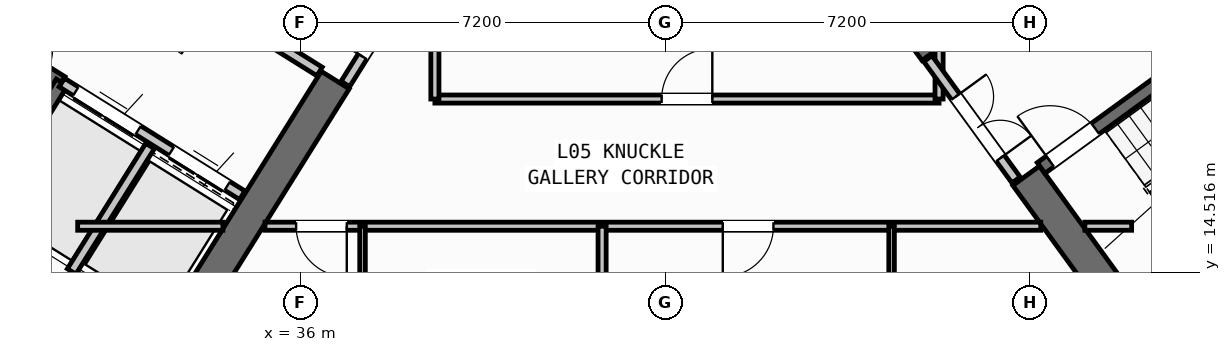
"""IFC4 building model, lengths in metres.
Left out: names, types, materials, properties, quantities, classifications, styles, units other than length and angle.
Written with IfcOpenShell. Run it as: python <this file> out.ifc"""

import sys

from ifc_helpers import new_model, si_unit, direction, frame, frame_2d, origin, place, context, subcontext, project, spatial, rectangle, extrude, source, transform, mapped, element, fill, save


model = new_model("IFC4")
c1 = context("Model", 3, precision=1e-05, world=origin(), true_north=direction((0.0, 1.0)))
c2 = subcontext(c1, "Body", "Model", "MODEL_VIEW")
j1 = project(units=[si_unit("LENGTHUNIT", "METRE"), si_unit("PLANEANGLEUNIT", "RADIAN")], contexts=[c1])
p1 = place(None, origin())
s1 = spatial("IfcSite", under=j1, at=p1, CompositionType="ELEMENT")
p2 = place(p1, origin())
s2 = spatial("IfcBuilding", under=s1, at=p2, CompositionType="ELEMENT")
p3 = place(p2, frame((0.0, 0.0, 24.0)))
s3 = spatial("IfcBuildingStorey", under=s2, at=p3, CompositionType="ELEMENT", Elevation=24.0)
p4 = place(p3, frame((33.409, 12.45, 0.0), z_axis=(0.0, 0.0, 1.0), x_axis=(-0.848051132073, 0.529914405721, 0.0)))
e1 = element("IfcWall", 1, at=p4, inside=s3, PredefinedType="SHEAR", context=c2, shape_type="SweptSolid", body=[
    extrude(rectangle(XDim=13.24, YDim=0.65, at=frame_2d((6.62, 0.0))), origin(), (0.0, 0.0, 1.0), 3.35),
])
p5 = place(p3, frame((36.683, 18.304, 0.0), z_axis=(0.0, 0.0, 1.0), x_axis=(-0.529899109053, -0.848060690178, 0.0)))
e2 = element("IfcWall", 2, at=p5, inside=s3, PredefinedType="SHEAR", context=c2, shape_type="SweptSolid", body=[
    extrude(rectangle(XDim=6.375, YDim=0.65, at=frame_2d((3.188, 0.0))), origin(), (0.0, 0.0, 1.0), 3.35),
])
p6 = place(p3, frame((52.318, 13.11, 0.0), z_axis=(0.0, 0.0, 1.0), x_axis=(0.809019445368, 0.587781878776, 0.0)))
e3 = element("IfcWall", 3, at=p6, inside=s3, PredefinedType="SHEAR", context=c2, shape_type="SweptSolid", body=[
    extrude(rectangle(XDim=12.44, YDim=0.65, at=frame_2d((6.22, 0.0))), origin(), (0.0, 0.0, 1.0), 3.35),
])
p7 = place(p3, frame((52.39, 13.564, 0.0), z_axis=(0.0, 0.0, 1.0), x_axis=(-0.58779688989, 0.809008539037, 0.0)))
e4 = element("IfcWall", 4, at=p7, inside=s3, PredefinedType="SHEAR", context=c2, shape_type="SweptSolid", body=[
    extrude(rectangle(XDim=3.525, YDim=0.65, at=frame_2d((1.763, 0.0))), origin(), (0.0, 0.0, 1.0), 3.35),
])
p8 = place(p3, frame((48.526, 18.884, 0.0), z_axis=(0.0, 0.0, 1.0), x_axis=(-0.58777996584, 0.809020835181, 0.0)))
e5 = element("IfcWall", 5, at=p8, inside=s3, PredefinedType="SHEAR", context=c2, shape_type="SweptSolid", body=[
    extrude(rectangle(XDim=6.375, YDim=0.65, at=frame_2d((3.188, 0.0))), origin(), (0.0, 0.0, 1.0), 3.35),
])
p9 = place(p3, frame((31.28, 18.261, 0.0), z_axis=(0.0, 0.0, 1.0), x_axis=(-0.848051618787, 0.529913626805, 0.0)))
e6 = element("IfcWall", 6, at=p9, inside=s3, PredefinedType="SHEAR", context=c2, shape_type="SweptSolid", body=[
    extrude(rectangle(XDim=7.46, YDim=0.26, at=frame_2d((3.73, 0.0))), origin(), (0.0, 0.0, 1.0), 3.35),
])
p10 = place(p9, frame((0.36, 0.0, 0.0)))
e7 = element("IfcOpeningElement", 7, at=p10, cuts=e6, PredefinedType="OPENING", context=c2, shape_type="SweptSolid", body=[
    extrude(rectangle(XDim=0.86, YDim=2.05, at=frame_2d((0.43, 1.025))), frame((0.0, 0.14, 0.0), z_axis=(0.0, -1.0, 0.0), x_axis=(1.0, 0.0, 0.0)), (0.0, 0.0, 1.0), 0.28),
])
p11 = place(p3, frame((31.288, 18.256, 0.0), z_axis=(0.0, 0.0, 1.0), x_axis=(-0.529943379326, -0.848033026897, 0.0)))
e8 = element("IfcWall", 8, at=p11, inside=s3, PredefinedType="SHEAR", context=c2, shape_type="SweptSolid", body=[
    extrude(rectangle(XDim=3.16, YDim=0.26, at=frame_2d((1.58, 0.0))), origin(), (0.0, 0.0, 1.0), 3.35),
])
p12 = place(p3, frame((34.848, 16.031, 0.0), z_axis=(0.0, 0.0, 1.0), x_axis=(-0.848044042236, 0.529925751807, 0.0)))
e9 = element("IfcWall", 9, at=p12, inside=s3, PredefinedType="STANDARD", context=c2, shape_type="SweptSolid", body=[
    extrude(rectangle(XDim=4.198, YDim=0.2, at=frame_2d((2.099, 0.0))), origin(), (0.0, 0.0, 1.0), 3.34),
])
p13 = place(p12, frame((0.348, 0.0, 0.0)))
e10 = element("IfcOpeningElement", 10, at=p13, cuts=e9, PredefinedType="OPENING", context=c2, shape_type="SweptSolid", body=[
    extrude(rectangle(XDim=1.3, YDim=2.2, at=frame_2d((0.65, 1.1))), frame((0.0, 0.11, 0.0), z_axis=(0.0, -1.0, 0.0), x_axis=(1.0, 0.0, 0.0)), (0.0, 0.0, 1.0), 0.22),
])
p14 = place(p12, frame((2.423, 0.0, 0.0)))
e11 = element("IfcOpeningElement", 11, at=p14, cuts=e9, PredefinedType="OPENING", context=c2, shape_type="SweptSolid", body=[
    extrude(rectangle(XDim=1.45, YDim=2.25, at=frame_2d((0.725, 1.125))), frame((0.0, 0.11, 0.0), z_axis=(0.0, -1.0, 0.0), x_axis=(1.0, 0.0, 0.0)), (0.0, 0.0, 1.0), 0.22),
])
p15 = place(p3, frame((36.374, 18.474, 0.0), z_axis=(0.0, 0.0, 1.0), x_axis=(-0.848051071577, 0.529914502535, 0.0)))
e12 = element("IfcWall", 12, at=p15, inside=s3, PredefinedType="STANDARD", context=c2, shape_type="SweptSolid", body=[
    extrude(rectangle(XDim=5.718, YDim=0.2, at=frame_2d((2.859, 0.0))), origin(), (0.0, 0.0, 1.0), 3.34),
])
p16 = place(p15, frame((2.498, 0.0, 0.0)))
e13 = element("IfcOpeningElement", 13, at=p16, cuts=e12, PredefinedType="OPENING", context=c2, shape_type="SweptSolid", body=[
    extrude(rectangle(XDim=1.15, YDim=2.1, at=frame_2d((0.575, 1.05))), frame((0.0, 0.11, 0.0), z_axis=(0.0, -1.0, 0.0), x_axis=(1.0, 0.0, 0.0)), (0.0, 0.0, 1.0), 0.22),
])
p17 = place(p3, frame((33.029, 17.003, 0.0), z_axis=(0.0, 0.0, 1.0), x_axis=(-0.529916267533, -0.848049968695, 0.0)))
e14 = element("IfcWall", 14, at=p17, inside=s3, PredefinedType="STANDARD", context=c2, shape_type="SweptSolid", body=[
    extrude(rectangle(XDim=2.92, YDim=0.2, at=frame_2d((1.46, 0.0))), origin(), (0.0, 0.0, 1.0), 3.34),
])
p18 = place(p3, frame((52.472, 14.013, 0.0), z_axis=(0.0, 0.0, 1.0), x_axis=(0.809028366311, 0.587769599847, 0.0)))
e15 = element("IfcWall", 15, at=p18, inside=s3, PredefinedType="SHEAR", context=c2, shape_type="SweptSolid", body=[
    extrude(rectangle(XDim=7.33, YDim=0.26, at=frame_2d((3.665, 0.0))), origin(), (0.0, 0.0, 1.0), 3.35),
])
p19 = place(p3, frame((50.615, 16.57, 0.0), z_axis=(0.0, 0.0, 1.0), x_axis=(0.809028366311, 0.587769599847, 0.0)))
e16 = element("IfcWall", 16, at=p19, inside=s3, PredefinedType="SHEAR", context=c2, shape_type="SweptSolid", body=[
    extrude(rectangle(XDim=7.33, YDim=0.26, at=frame_2d((3.665, 0.0))), origin(), (0.0, 0.0, 1.0), 3.35),
])
p20 = place(p19, frame((0.22, 0.0, 0.0)))
e17 = element("IfcOpeningElement", 17, at=p20, cuts=e16, PredefinedType="OPENING", context=c2, shape_type="SweptSolid", body=[
    extrude(rectangle(XDim=1.1, YDim=2.1, at=frame_2d((0.55, 1.05))), frame((0.0, 0.14, 0.0), z_axis=(0.0, -1.0, 0.0), x_axis=(1.0, 0.0, 0.0)), (0.0, 0.0, 1.0), 0.28),
])
p21 = place(p3, frame((32.164, 10.374, 0.0), z_axis=(0.0, 0.0, 1.0), x_axis=(-0.848044107957, 0.529925646633, 0.0)))
e18 = element("IfcWall", 18, at=p21, inside=s3, PredefinedType="PARTITIONING", context=c2, shape_type="SweptSolid", body=[
    extrude(rectangle(XDim=15.57, YDim=0.16, at=frame_2d((7.785, 0.0))), origin(), (0.0, 0.0, 1.0), 3.34),
])
p22 = place(p21, frame((10.83, 0.0, 0.0)))
e19 = element("IfcOpeningElement", 19, at=p22, cuts=e18, PredefinedType="OPENING", context=c2, shape_type="SweptSolid", body=[
    extrude(rectangle(XDim=1.0, YDim=2.1, at=frame_2d((0.5, 1.05))), frame((0.0, 0.09, 0.0), z_axis=(0.0, -1.0, 0.0), x_axis=(1.0, 0.0, 0.0)), (0.0, 0.0, 1.0), 0.18),
])
p23 = place(p3, frame((38.451, 20.737, 0.0), z_axis=(0.0, 0.0, 1.0), x_axis=(-0.529924799939, -0.848044637038, 0.0)))
e20 = element("IfcWall", 20, at=p23, inside=s3, PredefinedType="STANDARD", context=c2, shape_type="SweptSolid", body=[
    extrude(rectangle(XDim=2.96, YDim=0.2, at=frame_2d((1.48, 0.0))), origin(), (0.0, 0.0, 1.0), 3.34),
])
p24 = place(p23, frame((1.46, 0.0, 0.0)))
e21 = element("IfcOpeningElement", 21, at=p24, cuts=e20, PredefinedType="OPENING", context=c2, shape_type="SweptSolid", body=[
    extrude(rectangle(XDim=0.86, YDim=2.05, at=frame_2d((0.43, 1.025))), frame((0.0, 0.11, 0.0), z_axis=(0.0, -1.0, 0.0), x_axis=(1.0, 0.0, 0.0)), (0.0, 0.0, 1.0), 0.22),
])
p25 = place(p3, frame((31.6, 15.42, 0.0), z_axis=(0.0, 0.0, 1.0), x_axis=(1.0, 0.0, 0.0)))
e22 = element("IfcWall", 22, at=p25, inside=s3, PredefinedType="PARTITIONING", context=c2, shape_type="SweptSolid", body=[
    extrude(rectangle(XDim=2.866, YDim=0.16, at=frame_2d((1.433, 0.0))), origin(), (0.0, 0.0, 1.0), 3.34),
])
p26 = place(p3, frame((35.296, 15.42, 0.0), z_axis=(0.0, 0.0, 1.0), x_axis=(1.0, 0.0, 0.0)))
e23 = element("IfcWall", 23, at=p26, inside=s3, PredefinedType="PARTITIONING", context=c2, shape_type="SweptSolid", body=[
    extrude(rectangle(XDim=15.311, YDim=0.16, at=frame_2d((7.655, 0.0))), origin(), (0.0, 0.0, 1.0), 3.34),
])
p27 = place(p26, frame((0.615, 0.0, 0.0)))
e24 = element("IfcOpeningElement", 24, at=p27, cuts=e23, PredefinedType="OPENING", context=c2, shape_type="SweptSolid", body=[
    extrude(rectangle(XDim=1.0, YDim=2.1, at=frame_2d((0.5, 1.05))), frame((0.0, 0.09, 0.0), z_axis=(0.0, -1.0, 0.0), x_axis=(1.0, 0.0, 0.0)), (0.0, 0.0, 1.0), 0.18),
])
p28 = place(p26, frame((9.035, 0.0, 0.0)))
e25 = element("IfcOpeningElement", 25, at=p28, cuts=e23, PredefinedType="OPENING", context=c2, shape_type="SweptSolid", body=[
    extrude(rectangle(XDim=1.0, YDim=2.1, at=frame_2d((0.5, 1.05))), frame((0.0, 0.09, 0.0), z_axis=(0.0, -1.0, 0.0), x_axis=(1.0, 0.0, 0.0)), (0.0, 0.0, 1.0), 0.18),
])
p29 = place(p3, frame((51.477, 15.42, 0.0), z_axis=(0.0, 0.0, 1.0), x_axis=(1.0, 0.0, 0.0)))
e26 = element("IfcWall", 26, at=p29, inside=s3, PredefinedType="PARTITIONING", context=c2, shape_type="SweptSolid", body=[
    extrude(rectangle(XDim=0.923, YDim=0.16, at=frame_2d((0.461, 0.0))), origin(), (0.0, 0.0, 1.0), 3.34),
])
p30 = place(p3, frame((38.65, 17.93, 0.0), z_axis=(0.0, 0.0, 1.0), x_axis=(1.0, 0.0, 0.0)))
e27 = element("IfcWall", 27, at=p30, inside=s3, PredefinedType="PARTITIONING", context=c2, shape_type="SweptSolid", body=[
    extrude(rectangle(XDim=9.95, YDim=0.16, at=frame_2d((4.975, 0.0))), origin(), (0.0, 0.0, 1.0), 3.34),
])
p31 = place(p30, frame((4.475, 0.0, 0.0)))
e28 = element("IfcOpeningElement", 28, at=p31, cuts=e27, PredefinedType="OPENING", context=c2, shape_type="SweptSolid", body=[
    extrude(rectangle(XDim=1.0, YDim=2.1, at=frame_2d((0.5, 1.05))), frame((0.0, 0.09, 0.0), z_axis=(0.0, -1.0, 0.0), x_axis=(1.0, 0.0, 0.0)), (0.0, 0.0, 1.0), 0.18),
])
p32 = place(p3, frame((38.65, 17.93, 0.0), z_axis=(0.0, 0.0, 1.0), x_axis=(0.0, 1.0, 0.0)))
e29 = element("IfcWall", 29, at=p32, inside=s3, PredefinedType="PARTITIONING", context=c2, shape_type="SweptSolid", body=[
    extrude(rectangle(XDim=2.857, YDim=0.16, at=frame_2d((1.428, 0.0))), origin(), (0.0, 0.0, 1.0), 3.34),
])
p33 = place(p3, frame((48.6, 17.93, 0.0), z_axis=(0.0, 0.0, 1.0), x_axis=(0.0, 1.0, 0.0)))
e30 = element("IfcWall", 30, at=p33, inside=s3, PredefinedType="PARTITIONING", context=c2, shape_type="SweptSolid", body=[
    extrude(rectangle(XDim=0.993, YDim=0.16, at=frame_2d((0.496, 0.0))), origin(), (0.0, 0.0, 1.0), 3.34),
])
p34 = place(p3, frame((50.119, 16.333, 0.0), z_axis=(0.0, 0.0, 1.0), x_axis=(-0.587749856981, 0.809042709391, 0.0)))
e31 = element("IfcWall", 31, at=p34, inside=s3, PredefinedType="STANDARD", context=c2, shape_type="SweptSolid", body=[
    extrude(rectangle(XDim=2.96, YDim=0.2, at=frame_2d((1.48, 0.0))), origin(), (0.0, 0.0, 1.0), 3.34),
])
p35 = place(p34, frame((0.53, 0.0, 0.0)))
e32 = element("IfcOpeningElement", 32, at=p35, cuts=e31, PredefinedType="OPENING", context=c2, shape_type="SweptSolid", body=[
    extrude(rectangle(XDim=1.5, YDim=2.15, at=frame_2d((0.75, 1.075))), frame((0.0, 0.11, 0.0), z_axis=(0.0, -1.0, 0.0), x_axis=(1.0, 0.0, 0.0)), (0.0, 0.0, 1.0), 0.22),
])
p36 = place(p3, frame((41.95, 1.96, 0.0), z_axis=(0.0, 0.0, 1.0), x_axis=(0.0, 1.0, 0.0)))
e33 = element("IfcWall", 33, at=p36, inside=s3, PredefinedType="PARTITIONING", context=c2, shape_type="SweptSolid", body=[
    extrude(rectangle(XDim=13.46, YDim=0.16, at=frame_2d((6.73, 0.0))), origin(), (0.0, 0.0, 1.0), 3.34),
])
p37 = place(p3, frame((37.222, 1.96, 0.0), z_axis=(0.0, 0.0, 1.0), x_axis=(0.0, 1.0, 0.0)))
e34 = element("IfcWall", 34, at=p37, inside=s3, PredefinedType="PARTITIONING", context=c2, shape_type="SweptSolid", body=[
    extrude(rectangle(XDim=13.46, YDim=0.11, at=frame_2d((6.73, 0.0))), origin(), (0.0, 0.0, 1.0), 3.34),
])
p38 = place(p37, frame((5.2, 0.0, 0.0)))
e35 = element("IfcOpeningElement", 35, at=p38, cuts=e34, PredefinedType="OPENING", context=c2, shape_type="SweptSolid", body=[
    extrude(rectangle(XDim=0.92, YDim=2.08, at=frame_2d((0.46, 1.04))), frame((0.0, 0.065, 0.0), z_axis=(0.0, -1.0, 0.0), x_axis=(1.0, 0.0, 0.0)), (0.0, 0.0, 1.0), 0.13),
])
p39 = place(p37, frame((10.45, 0.0, 0.0)))
e36 = element("IfcOpeningElement", 36, at=p39, cuts=e34, PredefinedType="OPENING", context=c2, shape_type="SweptSolid", body=[
    extrude(rectangle(XDim=0.88, YDim=2.08, at=frame_2d((0.44, 1.04))), frame((0.0, 0.065, 0.0), z_axis=(0.0, -1.0, 0.0), x_axis=(1.0, 0.0, 0.0)), (0.0, 0.0, 1.0), 0.13),
])
p40 = place(p3, frame((47.663, 1.96, 0.0), z_axis=(0.0, 0.0, 1.0), x_axis=(0.0, 1.0, 0.0)))
e37 = element("IfcWall", 37, at=p40, inside=s3, PredefinedType="PARTITIONING", context=c2, shape_type="SweptSolid", body=[
    extrude(rectangle(XDim=13.46, YDim=0.11, at=frame_2d((6.73, 0.0))), origin(), (0.0, 0.0, 1.0), 3.34),
])
p41 = place(p40, frame((6.3, 0.0, 0.0)))
e38 = element("IfcOpeningElement", 38, at=p41, cuts=e37, PredefinedType="OPENING", context=c2, shape_type="SweptSolid", body=[
    extrude(rectangle(XDim=0.92, YDim=2.08, at=frame_2d((0.46, 1.04))), frame((0.0, 0.065, 0.0), z_axis=(0.0, -1.0, 0.0), x_axis=(1.0, 0.0, 0.0)), (0.0, 0.0, 1.0), 0.13),
])
p42 = place(p40, frame((11.1, 0.0, 0.0)))
e39 = element("IfcOpeningElement", 39, at=p42, cuts=e37, PredefinedType="OPENING", context=c2, shape_type="SweptSolid", body=[
    extrude(rectangle(XDim=0.88, YDim=2.08, at=frame_2d((0.44, 1.04))), frame((0.0, 0.065, 0.0), z_axis=(0.0, -1.0, 0.0), x_axis=(1.0, 0.0, 0.0)), (0.0, 0.0, 1.0), 0.13),
])
m1 = source(origin(), c2, "Body", "SweptSolid", [
    extrude(rectangle(XDim=1.3, YDim=2.2, at=frame_2d((0.65, 1.1))), frame((0.0, 0.025, 0.0), z_axis=(0.0, -1.0, 0.0), x_axis=(1.0, 0.0, 0.0)), (0.0, 0.0, 1.0), 0.05),
])
p43 = place(p13, origin())
e40 = element("IfcDoor", 40, at=p43, inside=s3, OperationType="DOUBLE_DOOR_SLIDING", PredefinedType="DOOR", context=c2, shape_type="MappedRepresentation", body=[
    mapped(m1, transform((0.0, 0.0, 0.0), scale=1.0)),
])
fill(e10, e40)
m2 = source(origin(), c2, "Body", "SweptSolid", [
    extrude(rectangle(XDim=1.45, YDim=2.25, at=frame_2d((0.725, 1.125))), frame((0.0, 0.025, 0.0), z_axis=(0.0, -1.0, 0.0), x_axis=(1.0, 0.0, 0.0)), (0.0, 0.0, 1.0), 0.05),
])
p44 = place(p14, origin())
e41 = element("IfcDoor", 41, at=p44, inside=s3, OperationType="DOUBLE_DOOR_SLIDING", PredefinedType="DOOR", context=c2, shape_type="MappedRepresentation", body=[
    mapped(m2, transform((0.0, 0.0, 0.0), scale=1.0)),
])
fill(e11, e41)
m3 = source(origin(), c2, "Body", "SweptSolid", [
    extrude(rectangle(XDim=1.1, YDim=2.1, at=frame_2d((0.55, 1.05))), frame((0.0, 0.025, 0.0), z_axis=(0.0, -1.0, 0.0), x_axis=(1.0, 0.0, 0.0)), (0.0, 0.0, 1.0), 0.05),
])
p45 = place(p20, origin())
e42 = element("IfcDoor", 42, at=p45, inside=s3, OperationType="SINGLE_SWING_LEFT", PredefinedType="DOOR", context=c2, shape_type="MappedRepresentation", body=[
    mapped(m3, transform((0.0, 0.0, 0.0), scale=1.0)),
])
fill(e17, e42)
m4 = source(origin(), c2, "Body", "SweptSolid", [
    extrude(rectangle(XDim=1.0, YDim=2.1, at=frame_2d((0.5, 1.05))), frame((0.0, 0.025, 0.0), z_axis=(0.0, -1.0, 0.0), x_axis=(1.0, 0.0, 0.0)), (0.0, 0.0, 1.0), 0.05),
])
p46 = place(p31, origin())
e43 = element("IfcDoor", 43, at=p46, inside=s3, OperationType="SINGLE_SWING_RIGHT", PredefinedType="DOOR", context=c2, shape_type="MappedRepresentation", body=[
    mapped(m4, transform((0.0, 0.0, 0.0), scale=1.0)),
])
fill(e28, e43)
m5 = source(origin(), c2, "Body", "SweptSolid", [
    extrude(rectangle(XDim=0.86, YDim=2.05, at=frame_2d((0.43, 1.025))), frame((0.0, 0.025, 0.0), z_axis=(0.0, -1.0, 0.0), x_axis=(1.0, 0.0, 0.0)), (0.0, 0.0, 1.0), 0.05),
])
p47 = place(p24, frame((0.86, 0.0, 0.0), z_axis=(0.0, 0.0, 1.0), x_axis=(-1.0, 0.0, 0.0)))
e44 = element("IfcDoor", 44, at=p47, inside=s3, OperationType="SINGLE_SWING_LEFT", PredefinedType="DOOR", context=c2, shape_type="MappedRepresentation", body=[
    mapped(m5, transform((0.0, 0.0, 0.0), scale=1.0)),
])
fill(e21, e44)
m6 = source(origin(), c2, "Body", "SweptSolid", [
    extrude(rectangle(XDim=1.5, YDim=2.15, at=frame_2d((0.75, 1.075))), frame((0.0, 0.025, 0.0), z_axis=(0.0, -1.0, 0.0), x_axis=(1.0, 0.0, 0.0)), (0.0, 0.0, 1.0), 0.05),
])
p48 = place(p35, frame((1.5, 0.0, 0.0), z_axis=(0.0, 0.0, 1.0), x_axis=(-1.0, 0.0, 0.0)))
e45 = element("IfcDoor", 45, at=p48, inside=s3, OperationType="DOUBLE_DOOR_SINGLE_SWING", PredefinedType="DOOR", context=c2, shape_type="MappedRepresentation", body=[
    mapped(m6, transform((0.0, 0.0, 0.0), scale=1.0)),
])
fill(e32, e45)
p49 = place(p27, frame((1.0, 0.0, 0.0), z_axis=(0.0, 0.0, 1.0), x_axis=(-1.0, 0.0, 0.0)))
e46 = element("IfcDoor", 46, at=p49, inside=s3, OperationType="SINGLE_SWING_LEFT", PredefinedType="DOOR", context=c2, shape_type="MappedRepresentation", body=[
    mapped(m4, transform((0.0, 0.0, 0.0), scale=1.0)),
])
fill(e24, e46)
p50 = place(p28, frame((1.0, 0.0, 0.0), z_axis=(0.0, 0.0, 1.0), x_axis=(-1.0, 0.0, 0.0)))
e47 = element("IfcDoor", 47, at=p50, inside=s3, OperationType="SINGLE_SWING_RIGHT", PredefinedType="DOOR", context=c2, shape_type="MappedRepresentation", body=[
    mapped(m4, transform((0.0, 0.0, 0.0), scale=1.0)),
])
fill(e25, e47)
save(model, sys.argv[1])
